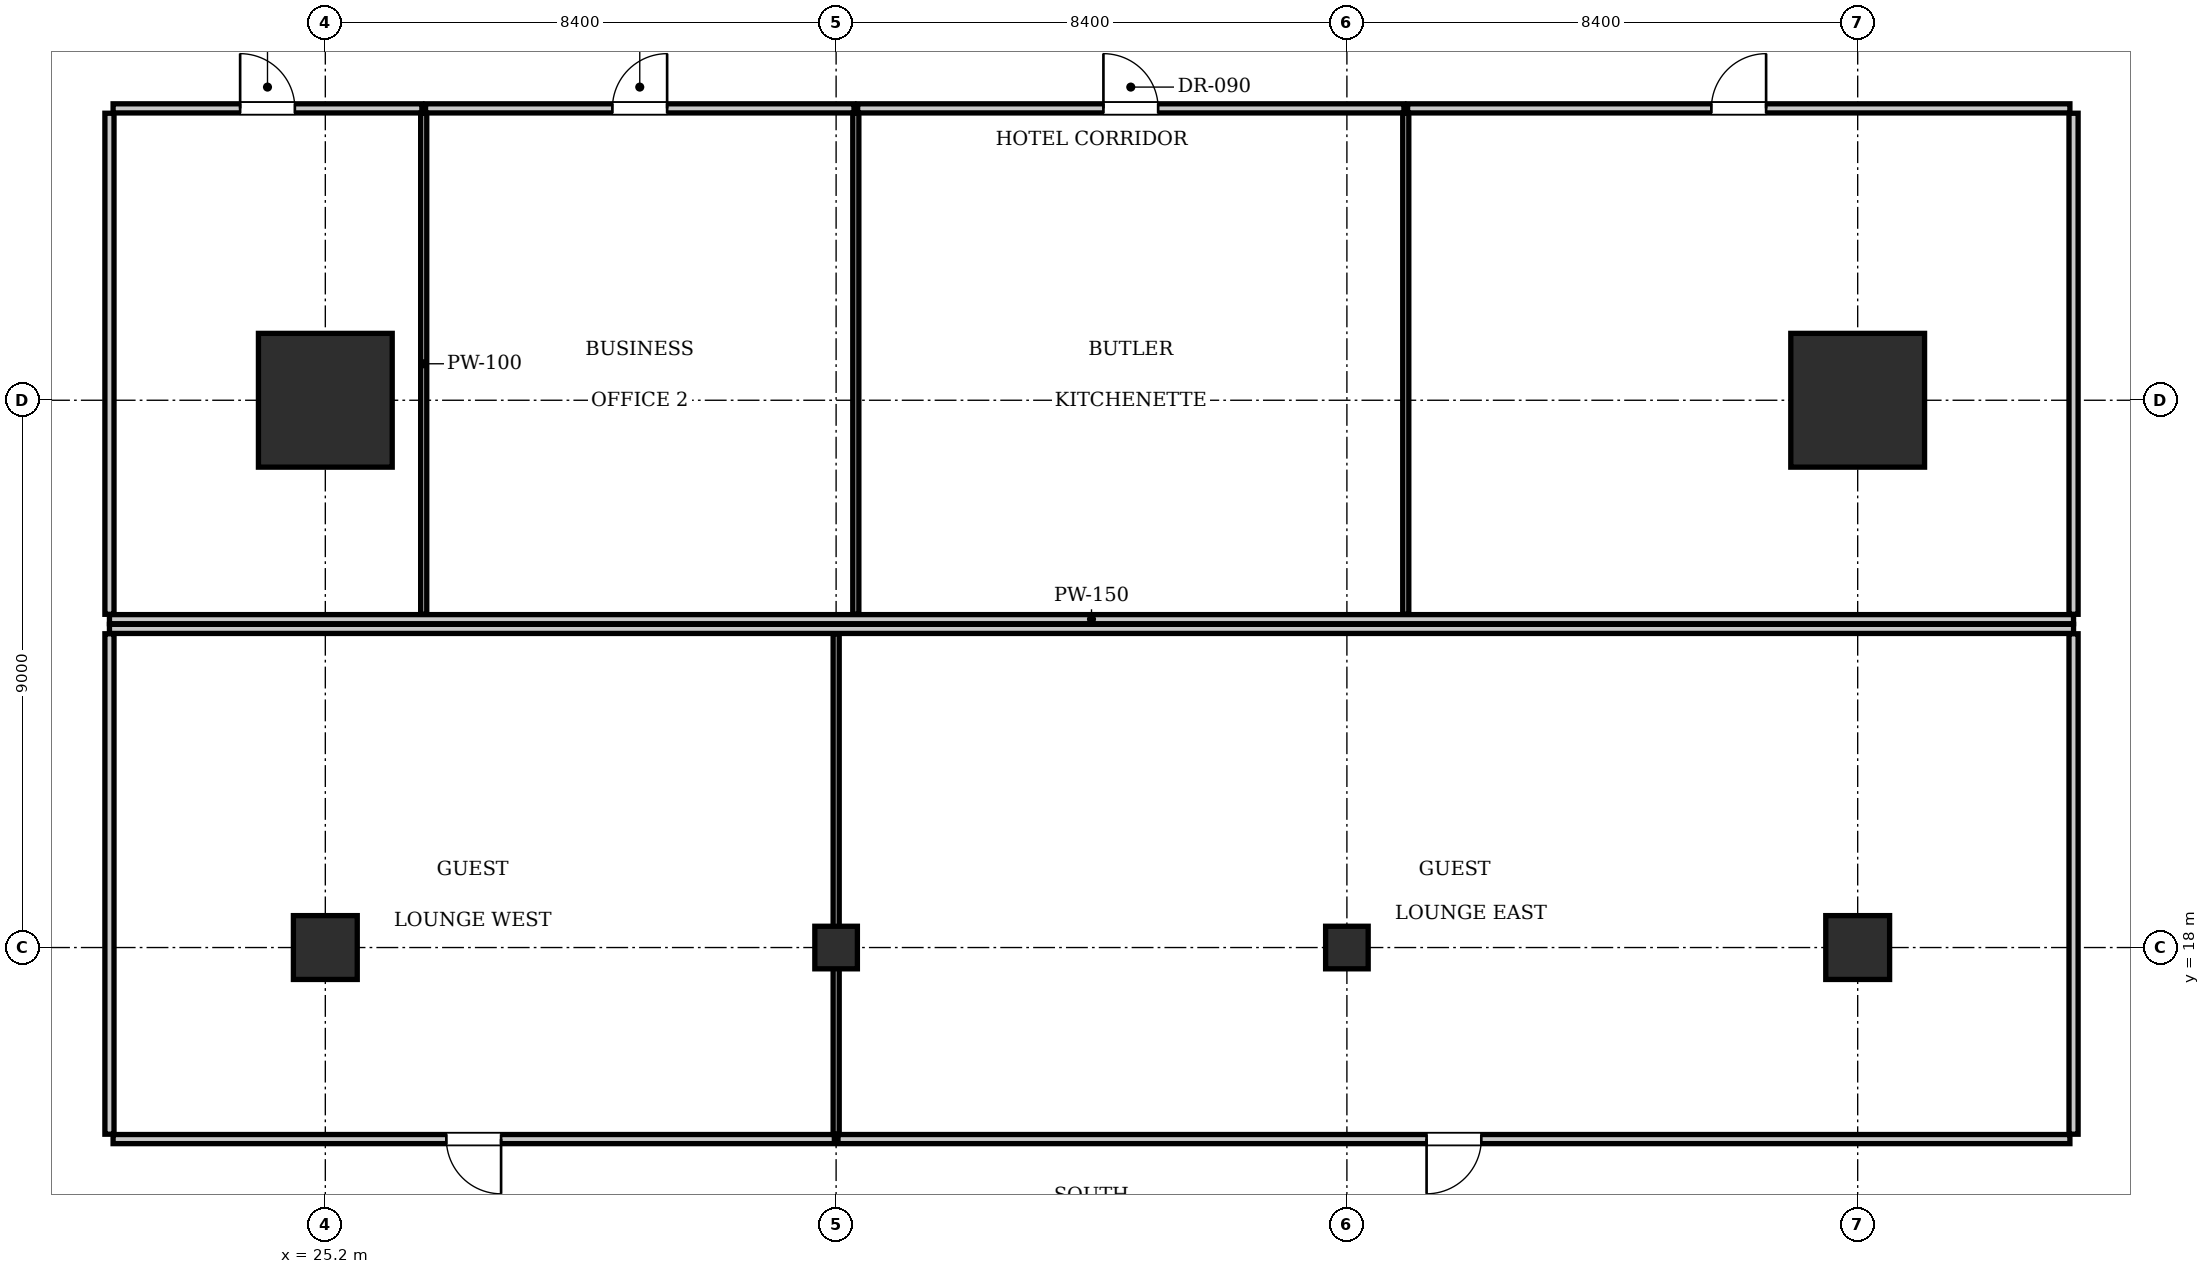
"""IFC4 building model, lengths in metres.
Left out: names, types, materials, properties, quantities, classifications, styles, units other than length and angle.
Written with IfcOpenShell. Run it as: python <this file> out.ifc"""

import sys

from ifc_helpers import new_model, si_unit, direction, frame, frame_2d, origin, origin_2d, place, context, subcontext, project, spatial, rectangle, i_section, extrude, element, fill, save


model = new_model("IFC4")
c1 = context("Model", 3, precision=1e-05, world=origin(), true_north=direction((0.0, 1.0)))
c2 = subcontext(c1, "Body", "Model", "MODEL_VIEW")
j1 = project(units=[si_unit("LENGTHUNIT", "METRE"), si_unit("PLANEANGLEUNIT", "RADIAN")], contexts=[c1])
p1 = place(None, origin())
s1 = spatial("IfcSite", under=j1, at=p1, CompositionType="ELEMENT")
p2 = place(p1, origin())
s2 = spatial("IfcBuilding", under=s1, at=p2, CompositionType="ELEMENT")
p3 = place(p2, frame((0.0, 0.0, 30.8)))
s3 = spatial("IfcBuildingStorey", under=s2, at=p3, CompositionType="ELEMENT", Elevation=30.8)
for number, where, z_axis, x_axis in (
    (1, (25.2, 27.0, 0.0), (0.0, 0.0, 1.0), (1.0, 0.0, 0.0)),
    (2, (50.4, 27.0, 0.0), (0.0, 0.0, 1.0), (1.0, 0.0, 0.0)),
):
    element("IfcColumn", number, at=place(p3, frame(where, z_axis=z_axis, x_axis=x_axis)), inside=s3, PredefinedType="COLUMN", context=c2, shape_type="SweptSolid", body=[
        extrude(rectangle(XDim=2.2, YDim=2.2, at=origin_2d()), origin(), (0.0, 0.0, 1.0), 3.85),
    ])
for number, where, z_axis, x_axis in (
    (3, (25.2, 18.0, 0.0), (0.0, 0.0, 1.0), (1.0, 0.0, 0.0)),
    (4, (50.4, 18.0, 0.0), (0.0, 0.0, 1.0), (1.0, 0.0, 0.0)),
):
    element("IfcColumn", number, at=place(p3, frame(where, z_axis=z_axis, x_axis=x_axis)), inside=s3, PredefinedType="COLUMN", context=c2, shape_type="SweptSolid", body=[
        extrude(rectangle(XDim=1.05, YDim=1.05, at=origin_2d()), origin(), (0.0, 0.0, 1.0), 3.85),
    ])
for number, where, z_axis, x_axis in (
    (5, (33.6, 18.0, 0.0), (0.0, 0.0, 1.0), (1.0, 0.0, 0.0)),
    (6, (42.0, 18.0, 0.0), (0.0, 0.0, 1.0), (1.0, 0.0, 0.0)),
):
    element("IfcColumn", number, at=place(p3, frame(where, z_axis=z_axis, x_axis=x_axis)), inside=s3, PredefinedType="COLUMN", context=c2, shape_type="SweptSolid", body=[
        extrude(i_section(OverallWidth=0.7, OverallDepth=0.7, WebThickness=0.028, FlangeThickness=0.044, at=origin_2d()), origin(), (0.0, 0.0, 1.0), 3.85),
    ])
p4 = place(p3, frame((21.65, 23.4, 0.0), z_axis=(0.0, 0.0, 1.0), x_axis=(1.0, 0.0, 0.0)))
e7 = element("IfcWall", 7, at=p4, inside=s3, PredefinedType="PARTITIONING", context=c2, shape_type="SweptSolid", body=[
    extrude(rectangle(XDim=32.3, YDim=0.15, at=frame_2d((16.15, 0.0))), origin(), (0.0, 0.0, 1.0), 3.61),
])
for number, where, z_axis, x_axis in (
    (8, (21.65, 23.48, 0.0), (0.0, 0.0, 1.0), (0.0, 1.0, 0.0)),
    (9, (53.95, 23.48, 0.0), (0.0, 0.0, 1.0), (0.0, 1.0, 0.0)),
):
    element("IfcWall", number, at=place(p3, frame(where, z_axis=z_axis, x_axis=x_axis)), inside=s3, PredefinedType="PARTITIONING", context=c2, shape_type="SweptSolid", body=[
        extrude(rectangle(XDim=8.24, YDim=0.15, at=frame_2d((4.12, 0.0))), origin(), (0.0, 0.0, 1.0), 3.61),
    ])
p5 = place(p3, frame((21.71, 31.8, 0.0), z_axis=(0.0, 0.0, 1.0), x_axis=(1.0, 0.0, 0.0)))
e10 = element("IfcWall", 10, at=p5, inside=s3, PredefinedType="PARTITIONING", context=c2, shape_type="SweptSolid", body=[
    extrude(rectangle(XDim=5.078, YDim=0.15, at=frame_2d((2.539, 0.0))), origin(), (0.0, 0.0, 1.0), 3.61),
])
p6 = place(p5, frame((2.089, 0.0, 0.0)))
e11 = element("IfcOpeningElement", 11, at=p6, cuts=e10, PredefinedType="OPENING", context=c2, shape_type="SweptSolid", body=[
    extrude(rectangle(XDim=0.9, YDim=2.1, at=frame_2d((0.45, 1.05))), frame((0.0, 0.085, 0.0), z_axis=(0.0, -1.0, 0.0), x_axis=(1.0, 0.0, 0.0)), (0.0, 0.0, 1.0), 0.17),
])
p7 = place(p3, frame((26.818, 23.48, 0.0), z_axis=(0.0, 0.0, 1.0), x_axis=(0.0, 1.0, 0.0)))
e12 = element("IfcWall", 12, at=p7, inside=s3, PredefinedType="PARTITIONING", context=c2, shape_type="SweptSolid", body=[
    extrude(rectangle(XDim=8.24, YDim=0.1, at=frame_2d((4.12, 0.0))), origin(), (0.0, 0.0, 1.0), 3.61),
])
p8 = place(p3, frame((26.848, 31.8, 0.0), z_axis=(0.0, 0.0, 1.0), x_axis=(1.0, 0.0, 0.0)))
e13 = element("IfcWall", 13, at=p8, inside=s3, PredefinedType="PARTITIONING", context=c2, shape_type="SweptSolid", body=[
    extrude(rectangle(XDim=7.046, YDim=0.15, at=frame_2d((3.523, 0.0))), origin(), (0.0, 0.0, 1.0), 3.61),
])
p9 = place(p8, frame((3.073, 0.0, 0.0)))
e14 = element("IfcOpeningElement", 14, at=p9, cuts=e13, PredefinedType="OPENING", context=c2, shape_type="SweptSolid", body=[
    extrude(rectangle(XDim=0.9, YDim=2.1, at=frame_2d((0.45, 1.05))), frame((0.0, 0.085, 0.0), z_axis=(0.0, -1.0, 0.0), x_axis=(1.0, 0.0, 0.0)), (0.0, 0.0, 1.0), 0.17),
])
p10 = place(p3, frame((33.924, 23.48, 0.0), z_axis=(0.0, 0.0, 1.0), x_axis=(0.0, 1.0, 0.0)))
e15 = element("IfcWall", 15, at=p10, inside=s3, PredefinedType="PARTITIONING", context=c2, shape_type="SweptSolid", body=[
    extrude(rectangle(XDim=8.24, YDim=0.1, at=frame_2d((4.12, 0.0))), origin(), (0.0, 0.0, 1.0), 3.61),
])
p11 = place(p3, frame((33.954, 31.8, 0.0), z_axis=(0.0, 0.0, 1.0), x_axis=(1.0, 0.0, 0.0)))
e16 = element("IfcWall", 16, at=p11, inside=s3, PredefinedType="PARTITIONING", context=c2, shape_type="SweptSolid", body=[
    extrude(rectangle(XDim=8.984, YDim=0.15, at=frame_2d((4.492, 0.0))), origin(), (0.0, 0.0, 1.0), 3.61),
])
p12 = place(p11, frame((4.042, 0.0, 0.0)))
e17 = element("IfcOpeningElement", 17, at=p12, cuts=e16, PredefinedType="OPENING", context=c2, shape_type="SweptSolid", body=[
    extrude(rectangle(XDim=0.9, YDim=2.1, at=frame_2d((0.45, 1.05))), frame((0.0, 0.085, 0.0), z_axis=(0.0, -1.0, 0.0), x_axis=(1.0, 0.0, 0.0)), (0.0, 0.0, 1.0), 0.17),
])
p13 = place(p3, frame((42.968, 23.48, 0.0), z_axis=(0.0, 0.0, 1.0), x_axis=(0.0, 1.0, 0.0)))
e18 = element("IfcWall", 18, at=p13, inside=s3, PredefinedType="PARTITIONING", context=c2, shape_type="SweptSolid", body=[
    extrude(rectangle(XDim=8.24, YDim=0.1, at=frame_2d((4.12, 0.0))), origin(), (0.0, 0.0, 1.0), 3.61),
])
p14 = place(p3, frame((42.998, 31.8, 0.0), z_axis=(0.0, 0.0, 1.0), x_axis=(1.0, 0.0, 0.0)))
e19 = element("IfcWall", 19, at=p14, inside=s3, PredefinedType="PARTITIONING", context=c2, shape_type="SweptSolid", body=[
    extrude(rectangle(XDim=10.892, YDim=0.15, at=frame_2d((5.446, 0.0))), origin(), (0.0, 0.0, 1.0), 3.61),
])
p15 = place(p14, frame((4.996, 0.0, 0.0)))
e20 = element("IfcOpeningElement", 20, at=p15, cuts=e19, PredefinedType="OPENING", context=c2, shape_type="SweptSolid", body=[
    extrude(rectangle(XDim=0.9, YDim=2.1, at=frame_2d((0.45, 1.05))), frame((0.0, 0.085, 0.0), z_axis=(0.0, -1.0, 0.0), x_axis=(1.0, 0.0, 0.0)), (0.0, 0.0, 1.0), 0.17),
])
p16 = place(p3, frame((21.65, 23.24, 0.0), z_axis=(0.0, 0.0, 1.0), x_axis=(1.0, 0.0, 0.0)))
e21 = element("IfcWall", 21, at=p16, inside=s3, PredefinedType="PARTITIONING", context=c2, shape_type="SweptSolid", body=[
    extrude(rectangle(XDim=32.3, YDim=0.15, at=frame_2d((16.15, 0.0))), origin(), (0.0, 0.0, 1.0), 3.61),
])
for number, where, z_axis, x_axis in (
    (22, (21.65, 14.93, 0.0), (0.0, 0.0, 1.0), (0.0, 1.0, 0.0)),
    (23, (53.95, 14.93, 0.0), (0.0, 0.0, 1.0), (0.0, 1.0, 0.0)),
):
    element("IfcWall", number, at=place(p3, frame(where, z_axis=z_axis, x_axis=x_axis)), inside=s3, PredefinedType="PARTITIONING", context=c2, shape_type="SweptSolid", body=[
        extrude(rectangle(XDim=8.23, YDim=0.15, at=frame_2d((4.115, 0.0))), origin(), (0.0, 0.0, 1.0), 3.61),
    ])
p17 = place(p3, frame((21.71, 14.85, 0.0), z_axis=(0.0, 0.0, 1.0), x_axis=(1.0, 0.0, 0.0)))
e24 = element("IfcWall", 24, at=p17, inside=s3, PredefinedType="PARTITIONING", context=c2, shape_type="SweptSolid", body=[
    extrude(rectangle(XDim=11.861, YDim=0.15, at=frame_2d((5.931, 0.0))), origin(), (0.0, 0.0, 1.0), 3.61),
])
p18 = place(p17, frame((5.48, 0.0, 0.0)))
e25 = element("IfcOpeningElement", 25, at=p18, cuts=e24, PredefinedType="OPENING", context=c2, shape_type="SweptSolid", body=[
    extrude(rectangle(XDim=0.9, YDim=2.1, at=frame_2d((0.45, 1.05))), frame((0.0, 0.085, 0.0), z_axis=(0.0, -1.0, 0.0), x_axis=(1.0, 0.0, 0.0)), (0.0, 0.0, 1.0), 0.17),
])
p19 = place(p3, frame((33.601, 14.93, 0.0), z_axis=(0.0, 0.0, 1.0), x_axis=(0.0, 1.0, 0.0)))
e26 = element("IfcWall", 26, at=p19, inside=s3, PredefinedType="PARTITIONING", context=c2, shape_type="SweptSolid", body=[
    extrude(rectangle(XDim=8.23, YDim=0.1, at=frame_2d((4.115, 0.0))), origin(), (0.0, 0.0, 1.0), 2.975),
])
p20 = place(p3, frame((33.631, 14.85, 0.0), z_axis=(0.0, 0.0, 1.0), x_axis=(1.0, 0.0, 0.0)))
e27 = element("IfcWall", 27, at=p20, inside=s3, PredefinedType="PARTITIONING", context=c2, shape_type="SweptSolid", body=[
    extrude(rectangle(XDim=20.259, YDim=0.15, at=frame_2d((10.129, 0.0))), origin(), (0.0, 0.0, 1.0), 3.61),
])
p21 = place(p20, frame((9.679, 0.0, 0.0)))
e28 = element("IfcOpeningElement", 28, at=p21, cuts=e27, PredefinedType="OPENING", context=c2, shape_type="SweptSolid", body=[
    extrude(rectangle(XDim=0.9, YDim=2.1, at=frame_2d((0.45, 1.05))), frame((0.0, 0.085, 0.0), z_axis=(0.0, -1.0, 0.0), x_axis=(1.0, 0.0, 0.0)), (0.0, 0.0, 1.0), 0.17),
])
p22 = place(p6, origin())
e29 = element("IfcDoor", 29, at=p22, inside=s3, OperationType="SINGLE_SWING_LEFT", PredefinedType="DOOR", context=c2, shape_type="SweptSolid", body=[
    extrude(rectangle(XDim=0.9, YDim=2.1, at=frame_2d((0.45, 1.05))), frame((0.0, 0.025, 0.0), z_axis=(0.0, -1.0, 0.0), x_axis=(1.0, 0.0, 0.0)), (0.0, 0.0, 1.0), 0.05),
])
fill(e11, e29)
p23 = place(p9, origin())
e30 = element("IfcDoor", 30, at=p23, inside=s3, OperationType="SINGLE_SWING_RIGHT", PredefinedType="DOOR", context=c2, shape_type="SweptSolid", body=[
    extrude(rectangle(XDim=0.9, YDim=2.1, at=frame_2d((0.45, 1.05))), frame((0.0, 0.025, 0.0), z_axis=(0.0, -1.0, 0.0), x_axis=(1.0, 0.0, 0.0)), (0.0, 0.0, 1.0), 0.05),
])
fill(e14, e30)
p24 = place(p12, origin())
e31 = element("IfcDoor", 31, at=p24, inside=s3, OperationType="SINGLE_SWING_LEFT", PredefinedType="DOOR", context=c2, shape_type="SweptSolid", body=[
    extrude(rectangle(XDim=0.9, YDim=2.1, at=frame_2d((0.45, 1.05))), frame((0.0, 0.025, 0.0), z_axis=(0.0, -1.0, 0.0), x_axis=(1.0, 0.0, 0.0)), (0.0, 0.0, 1.0), 0.05),
])
fill(e17, e31)
p25 = place(p15, origin())
e32 = element("IfcDoor", 32, at=p25, inside=s3, OperationType="SINGLE_SWING_RIGHT", PredefinedType="DOOR", context=c2, shape_type="SweptSolid", body=[
    extrude(rectangle(XDim=0.9, YDim=2.1, at=frame_2d((0.45, 1.05))), frame((0.0, 0.025, 0.0), z_axis=(0.0, -1.0, 0.0), x_axis=(1.0, 0.0, 0.0)), (0.0, 0.0, 1.0), 0.05),
])
fill(e20, e32)
p26 = place(p18, frame((0.9, 0.0, 0.0), z_axis=(0.0, 0.0, 1.0), x_axis=(-1.0, 0.0, 0.0)))
e33 = element("IfcDoor", 33, at=p26, inside=s3, OperationType="SINGLE_SWING_LEFT", PredefinedType="DOOR", context=c2, shape_type="SweptSolid", body=[
    extrude(rectangle(XDim=0.9, YDim=2.1, at=frame_2d((0.45, 1.05))), frame((0.0, 0.025, 0.0), z_axis=(0.0, -1.0, 0.0), x_axis=(1.0, 0.0, 0.0)), (0.0, 0.0, 1.0), 0.05),
])
fill(e25, e33)
p27 = place(p21, frame((0.9, 0.0, 0.0), z_axis=(0.0, 0.0, 1.0), x_axis=(-1.0, 0.0, 0.0)))
e34 = element("IfcDoor", 34, at=p27, inside=s3, OperationType="SINGLE_SWING_RIGHT", PredefinedType="DOOR", context=c2, shape_type="SweptSolid", body=[
    extrude(rectangle(XDim=0.9, YDim=2.1, at=frame_2d((0.45, 1.05))), frame((0.0, 0.025, 0.0), z_axis=(0.0, -1.0, 0.0), x_axis=(1.0, 0.0, 0.0)), (0.0, 0.0, 1.0), 0.05),
])
fill(e28, e34)
save(model, sys.argv[1])
